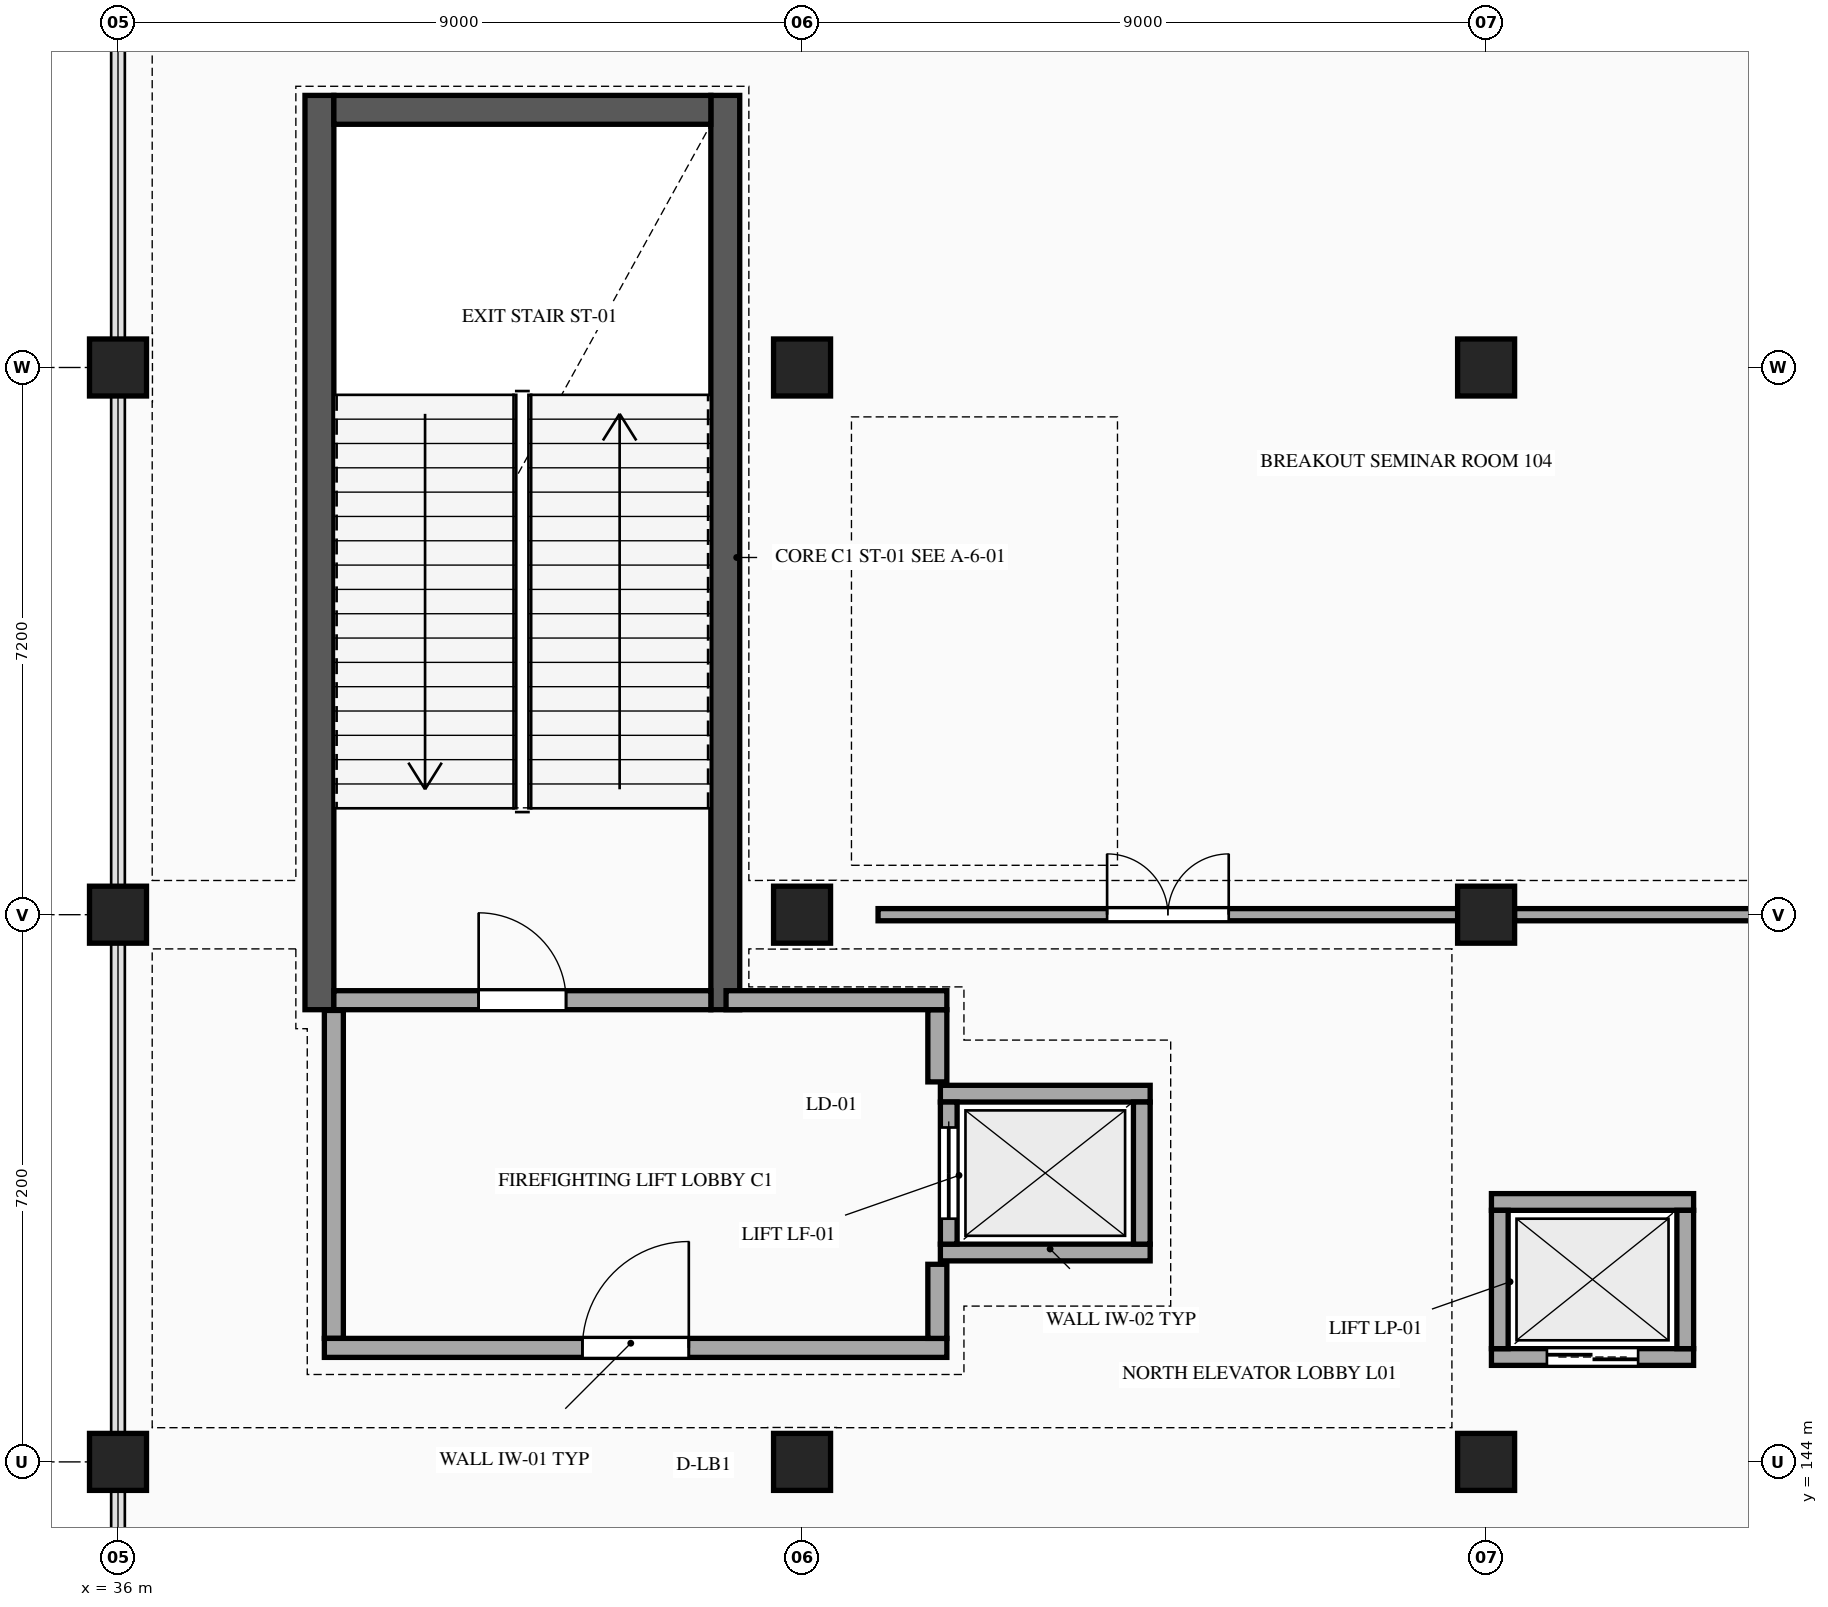
"""IFC4 building model, lengths in metres.
Left out: names, types, materials, properties, quantities, classifications, styles, units other than length and angle.
Written with IfcOpenShell. Run it as: python <this file> out.ifc"""

import sys

from ifc_helpers import new_model, si_unit, direction, frame, frame_2d, origin, origin_2d, place, context, subcontext, project, spatial, rectangle, extrude, element, fill, save


model = new_model("IFC4")
c1 = context("Model", 3, precision=1e-05, world=origin(), true_north=direction((0.0, 1.0)))
c2 = subcontext(c1, "Body", "Model", "MODEL_VIEW")
j1 = project(units=[si_unit("LENGTHUNIT", "METRE"), si_unit("PLANEANGLEUNIT", "RADIAN")], contexts=[c1])
p1 = place(None, origin())
s1 = spatial("IfcSite", under=j1, at=p1, CompositionType="ELEMENT")
p2 = place(p1, origin())
s2 = spatial("IfcBuilding", under=s1, at=p2, CompositionType="ELEMENT")
p3 = place(p2, frame((0.0, 0.0, 5.4)))
s3 = spatial("IfcBuildingStorey", under=s2, at=p3, CompositionType="ELEMENT", Elevation=5.4)
for number, where, z_axis, x_axis in (
    (1, (36.0, 144.0, 0.0), (0.0, 0.0, 1.0), (1.0, 0.0, 0.0)),
    (2, (36.0, 151.2, 0.0), (0.0, 0.0, 1.0), (1.0, 0.0, 0.0)),
    (3, (36.0, 158.4, 0.0), (0.0, 0.0, 1.0), (1.0, 0.0, 0.0)),
    (4, (45.0, 144.0, 0.0), (0.0, 0.0, 1.0), (1.0, 0.0, 0.0)),
    (5, (45.0, 151.2, 0.0), (0.0, 0.0, 1.0), (1.0, 0.0, 0.0)),
    (6, (45.0, 158.4, 0.0), (0.0, 0.0, 1.0), (1.0, 0.0, 0.0)),
    (7, (54.0, 144.0, 0.0), (0.0, 0.0, 1.0), (1.0, 0.0, 0.0)),
    (8, (54.0, 151.2, 0.0), (0.0, 0.0, 1.0), (1.0, 0.0, 0.0)),
    (9, (54.0, 158.4, 0.0), (0.0, 0.0, 1.0), (1.0, 0.0, 0.0)),
):
    element("IfcColumn", number, at=place(p3, frame(where, z_axis=z_axis, x_axis=x_axis)), inside=s3, PredefinedType="COLUMN", context=c2, shape_type="SweptSolid", body=[
        extrude(rectangle(XDim=0.75, YDim=0.75, at=origin_2d()), origin(), (0.0, 0.0, 1.0), 5.4),
    ])
for number, where, z_axis, x_axis in (
    (10, (38.65, 149.95, 0.0), (0.0, 0.0, 1.0), (0.0, 1.0, 0.0)),
    (11, (43.99, 161.98, 0.0), (0.0, 0.0, 1.0), (0.0, -1.0, 0.0)),
):
    element("IfcWall", number, at=place(p3, frame(where, z_axis=z_axis, x_axis=x_axis)), inside=s3, PredefinedType="SHEAR", context=c2, shape_type="SweptSolid", body=[
        extrude(rectangle(XDim=12.03, YDim=0.38, at=frame_2d((6.015, 0.0))), origin(), (0.0, 0.0, 1.0), 5.12),
    ])
p4 = place(p3, frame((38.84, 161.79, 0.0), z_axis=(0.0, 0.0, 1.0), x_axis=(1.0, 0.0, 0.0)))
e12 = element("IfcWall", 12, at=p4, inside=s3, PredefinedType="SHEAR", context=c2, shape_type="SweptSolid", body=[
    extrude(rectangle(XDim=4.96, YDim=0.38, at=frame_2d((2.48, 0.0))), origin(), (0.0, 0.0, 1.0), 5.12),
])
p5 = place(p3, frame((38.84, 150.075, 0.0), z_axis=(0.0, 0.0, 1.0), x_axis=(1.0, 0.0, 0.0)))
e13 = element("IfcWall", 13, at=p5, inside=s3, PredefinedType="STANDARD", context=c2, shape_type="SweptSolid", body=[
    extrude(rectangle(XDim=4.96, YDim=0.25, at=frame_2d((2.48, 0.0))), origin(), (0.0, 0.0, 1.0), 5.12),
])
p6 = place(p5, frame((1.905, 0.0, 0.0)))
e14 = element("IfcOpeningElement", 14, at=p6, cuts=e13, PredefinedType="OPENING", context=c2, shape_type="SweptSolid", body=[
    extrude(rectangle(XDim=1.15, YDim=2.2, at=frame_2d((0.575, 1.1))), frame((0.0, 0.135, 0.0), z_axis=(0.0, -1.0, 0.0), x_axis=(1.0, 0.0, 0.0)), (0.0, 0.0, 1.0), 0.27),
])
for number, where, z_axis, x_axis in (
    (15, (46.82, 146.755, 0.0), (0.0, 0.0, 1.0), (1.0, 0.0, 0.0)),
    (16, (49.58, 148.845, 0.0), (0.0, 0.0, 1.0), (-1.0, 0.0, 0.0)),
):
    element("IfcWall", number, at=place(p3, frame(where, z_axis=z_axis, x_axis=x_axis)), inside=s3, PredefinedType="STANDARD", context=c2, shape_type="SweptSolid", body=[
        extrude(rectangle(XDim=2.76, YDim=0.22, at=frame_2d((1.38, 0.0))), origin(), (0.0, 0.0, 1.0), 5.12),
    ])
p7 = place(p3, frame((46.93, 148.735, 0.0), z_axis=(0.0, 0.0, 1.0), x_axis=(0.0, -1.0, 0.0)))
e17 = element("IfcWall", 17, at=p7, inside=s3, PredefinedType="STANDARD", context=c2, shape_type="SweptSolid", body=[
    extrude(rectangle(XDim=1.87, YDim=0.22, at=frame_2d((0.935, 0.0))), origin(), (0.0, 0.0, 1.0), 5.12),
])
p8 = place(p7, frame((0.335, 0.0, 0.0)))
e18 = element("IfcOpeningElement", 18, at=p8, cuts=e17, PredefinedType="OPENING", context=c2, shape_type="SweptSolid", body=[
    extrude(rectangle(XDim=1.2, YDim=2.2, at=frame_2d((0.6, 1.1))), frame((0.0, 0.12, 0.0), z_axis=(0.0, -1.0, 0.0), x_axis=(1.0, 0.0, 0.0)), (0.0, 0.0, 1.0), 0.24),
])
p9 = place(p3, frame((49.47, 146.865, 0.0), z_axis=(0.0, 0.0, 1.0), x_axis=(0.0, 1.0, 0.0)))
e19 = element("IfcWall", 19, at=p9, inside=s3, PredefinedType="STANDARD", context=c2, shape_type="SweptSolid", body=[
    extrude(rectangle(XDim=1.87, YDim=0.22, at=frame_2d((0.935, 0.0))), origin(), (0.0, 0.0, 1.0), 5.12),
])
p10 = place(p3, frame((54.07, 145.38, 0.0), z_axis=(0.0, 0.0, 1.0), x_axis=(1.0, 0.0, 0.0)))
e20 = element("IfcWall", 20, at=p10, inside=s3, PredefinedType="STANDARD", context=c2, shape_type="SweptSolid", body=[
    extrude(rectangle(XDim=2.66, YDim=0.22, at=frame_2d((1.33, 0.0))), origin(), (0.0, 0.0, 1.0), 4.508),
])
p11 = place(p10, frame((0.73, 0.0, 0.0)))
e21 = element("IfcOpeningElement", 21, at=p11, cuts=e20, PredefinedType="OPENING", context=c2, shape_type="SweptSolid", body=[
    extrude(rectangle(XDim=1.2, YDim=2.2, at=frame_2d((0.6, 1.1))), frame((0.0, 0.12, 0.0), z_axis=(0.0, -1.0, 0.0), x_axis=(1.0, 0.0, 0.0)), (0.0, 0.0, 1.0), 0.24),
])
p12 = place(p3, frame((56.73, 147.42, 0.0), z_axis=(0.0, 0.0, 1.0), x_axis=(-1.0, 0.0, 0.0)))
e22 = element("IfcWall", 22, at=p12, inside=s3, PredefinedType="STANDARD", context=c2, shape_type="SweptSolid", body=[
    extrude(rectangle(XDim=2.66, YDim=0.22, at=frame_2d((1.33, 0.0))), origin(), (0.0, 0.0, 1.0), 4.508),
])
for number, where, z_axis, x_axis in (
    (23, (54.18, 147.31, 0.0), (0.0, 0.0, 1.0), (0.0, -1.0, 0.0)),
    (24, (56.62, 145.49, 0.0), (0.0, 0.0, 1.0), (0.0, 1.0, 0.0)),
):
    element("IfcWall", number, at=place(p3, frame(where, z_axis=z_axis, x_axis=x_axis)), inside=s3, PredefinedType="STANDARD", context=c2, shape_type="SweptSolid", body=[
        extrude(rectangle(XDim=1.82, YDim=0.22, at=frame_2d((0.91, 0.0))), origin(), (0.0, 0.0, 1.0), 4.508),
    ])
p13 = place(p3, frame((38.84, 149.94, 0.0), z_axis=(0.0, 0.0, 1.0), x_axis=(0.0, -1.0, 0.0)))
e25 = element("IfcWall", 25, at=p13, inside=s3, PredefinedType="STANDARD", context=c2, shape_type="SweptSolid", body=[
    extrude(rectangle(XDim=4.315, YDim=0.25, at=frame_2d((2.157, 0.0))), origin(), (0.0, 0.0, 1.0), 4.508),
])
p14 = place(p3, frame((38.715, 145.5, 0.0), z_axis=(0.0, 0.0, 1.0), x_axis=(1.0, 0.0, 0.0)))
e26 = element("IfcWall", 26, at=p14, inside=s3, PredefinedType="STANDARD", context=c2, shape_type="SweptSolid", body=[
    extrude(rectangle(XDim=8.19, YDim=0.25, at=frame_2d((4.095, 0.0))), origin(), (0.0, 0.0, 1.0), 4.508),
])
p15 = place(p14, frame((3.395, 0.0, 0.0)))
e27 = element("IfcOpeningElement", 27, at=p15, cuts=e26, PredefinedType="OPENING", context=c2, shape_type="SweptSolid", body=[
    extrude(rectangle(XDim=1.4, YDim=2.2, at=frame_2d((0.7, 1.1))), frame((0.0, 0.135, 0.0), z_axis=(0.0, -1.0, 0.0), x_axis=(1.0, 0.0, 0.0)), (0.0, 0.0, 1.0), 0.27),
])
p16 = place(p3, frame((46.78, 145.625, 0.0), z_axis=(0.0, 0.0, 1.0), x_axis=(0.0, 1.0, 0.0)))
e28 = element("IfcWall", 28, at=p16, inside=s3, PredefinedType="STANDARD", context=c2, shape_type="SweptSolid", body=[
    extrude(rectangle(XDim=0.975, YDim=0.25, at=frame_2d((0.488, 0.0))), origin(), (0.0, 0.0, 1.0), 4.508),
])
p17 = place(p3, frame((46.78, 149.0, 0.0), z_axis=(0.0, 0.0, 1.0), x_axis=(0.0, 1.0, 0.0)))
e29 = element("IfcWall", 29, at=p17, inside=s3, PredefinedType="STANDARD", context=c2, shape_type="SweptSolid", body=[
    extrude(rectangle(XDim=0.95, YDim=0.25, at=frame_2d((0.475, 0.0))), origin(), (0.0, 0.0, 1.0), 4.508),
])
p18 = place(p3, frame((44.0, 150.075, 0.0), z_axis=(0.0, 0.0, 1.0), x_axis=(1.0, 0.0, 0.0)))
e30 = element("IfcWall", 30, at=p18, inside=s3, PredefinedType="STANDARD", context=c2, shape_type="SweptSolid", body=[
    extrude(rectangle(XDim=2.905, YDim=0.25, at=frame_2d((1.453, 0.0))), origin(), (0.0, 0.0, 1.0), 4.508),
])
p19 = place(p3, frame((46.0, 151.2, 0.0), z_axis=(0.0, 0.0, 1.0), x_axis=(1.0, 0.0, 0.0)))
e31 = element("IfcWall", 31, at=p19, inside=s3, PredefinedType="PARTITIONING", context=c2, shape_type="SweptSolid", body=[
    extrude(rectangle(XDim=7.627, YDim=0.16, at=frame_2d((3.813, 0.0))), origin(), (0.0, 0.0, 1.0), 4.498),
])
p20 = place(p19, frame((3.013, 0.0, 0.0)))
e32 = element("IfcOpeningElement", 32, at=p20, cuts=e31, PredefinedType="OPENING", context=c2, shape_type="SweptSolid", body=[
    extrude(rectangle(XDim=1.6, YDim=2.2, at=frame_2d((0.8, 1.1))), frame((0.0, 0.09, 0.0), z_axis=(0.0, -1.0, 0.0), x_axis=(1.0, 0.0, 0.0)), (0.0, 0.0, 1.0), 0.18),
])
p21 = place(p3, frame((54.373, 151.2, 0.0), z_axis=(0.0, 0.0, 1.0), x_axis=(1.0, 0.0, 0.0)))
e33 = element("IfcWall", 33, at=p21, inside=s3, PredefinedType="PARTITIONING", context=c2, shape_type="SweptSolid", body=[
    extrude(rectangle(XDim=8.254, YDim=0.16, at=frame_2d((4.127, 0.0))), origin(), (0.0, 0.0, 1.0), 4.498),
])
p22 = place(p21, frame((3.227, 0.0, 0.0)))
e34 = element("IfcOpeningElement", 34, at=p22, cuts=e33, PredefinedType="OPENING", context=c2, shape_type="SweptSolid", body=[
    extrude(rectangle(XDim=1.8, YDim=2.25, at=frame_2d((0.9, 1.125))), frame((0.0, 0.09, 0.0), z_axis=(0.0, -1.0, 0.0), x_axis=(1.0, 0.0, 0.0)), (0.0, 0.0, 1.0), 0.18),
])
p23 = place(p6, origin())
e35 = element("IfcDoor", 35, at=p23, inside=s3, OperationType="SINGLE_SWING_LEFT", PredefinedType="DOOR", context=c2, shape_type="SweptSolid", body=[
    extrude(rectangle(XDim=1.15, YDim=2.2, at=frame_2d((0.575, 1.1))), frame((0.0, 0.025, 0.0), z_axis=(0.0, -1.0, 0.0), x_axis=(1.0, 0.0, 0.0)), (0.0, 0.0, 1.0), 0.05),
])
fill(e14, e35)
p24 = place(p8, origin())
e36 = element("IfcDoor", 36, at=p24, inside=s3, OperationType="DOUBLE_DOOR_SLIDING", PredefinedType="DOOR", context=c2, shape_type="SweptSolid", body=[
    extrude(rectangle(XDim=1.2, YDim=2.2, at=frame_2d((0.6, 1.1))), frame((0.0, 0.025, 0.0), z_axis=(0.0, -1.0, 0.0), x_axis=(1.0, 0.0, 0.0)), (0.0, 0.0, 1.0), 0.05),
])
fill(e18, e36)
p25 = place(p11, origin())
e37 = element("IfcDoor", 37, at=p25, inside=s3, OperationType="DOUBLE_DOOR_SLIDING", PredefinedType="DOOR", context=c2, shape_type="SweptSolid", body=[
    extrude(rectangle(XDim=1.2, YDim=2.2, at=frame_2d((0.6, 1.1))), frame((0.0, 0.025, 0.0), z_axis=(0.0, -1.0, 0.0), x_axis=(1.0, 0.0, 0.0)), (0.0, 0.0, 1.0), 0.05),
])
fill(e21, e37)
p26 = place(p15, origin())
e38 = element("IfcDoor", 38, at=p26, inside=s3, OperationType="SINGLE_SWING_RIGHT", PredefinedType="DOOR", context=c2, shape_type="SweptSolid", body=[
    extrude(rectangle(XDim=1.4, YDim=2.2, at=frame_2d((0.7, 1.1))), frame((0.0, 0.025, 0.0), z_axis=(0.0, -1.0, 0.0), x_axis=(1.0, 0.0, 0.0)), (0.0, 0.0, 1.0), 0.05),
])
fill(e27, e38)
p27 = place(p20, origin())
e39 = element("IfcDoor", 39, at=p27, inside=s3, OperationType="DOUBLE_DOOR_SINGLE_SWING", PredefinedType="DOOR", context=c2, shape_type="SweptSolid", body=[
    extrude(rectangle(XDim=1.6, YDim=2.2, at=frame_2d((0.8, 1.1))), frame((0.0, 0.025, 0.0), z_axis=(0.0, -1.0, 0.0), x_axis=(1.0, 0.0, 0.0)), (0.0, 0.0, 1.0), 0.05),
])
fill(e32, e39)
save(model, sys.argv[1])
